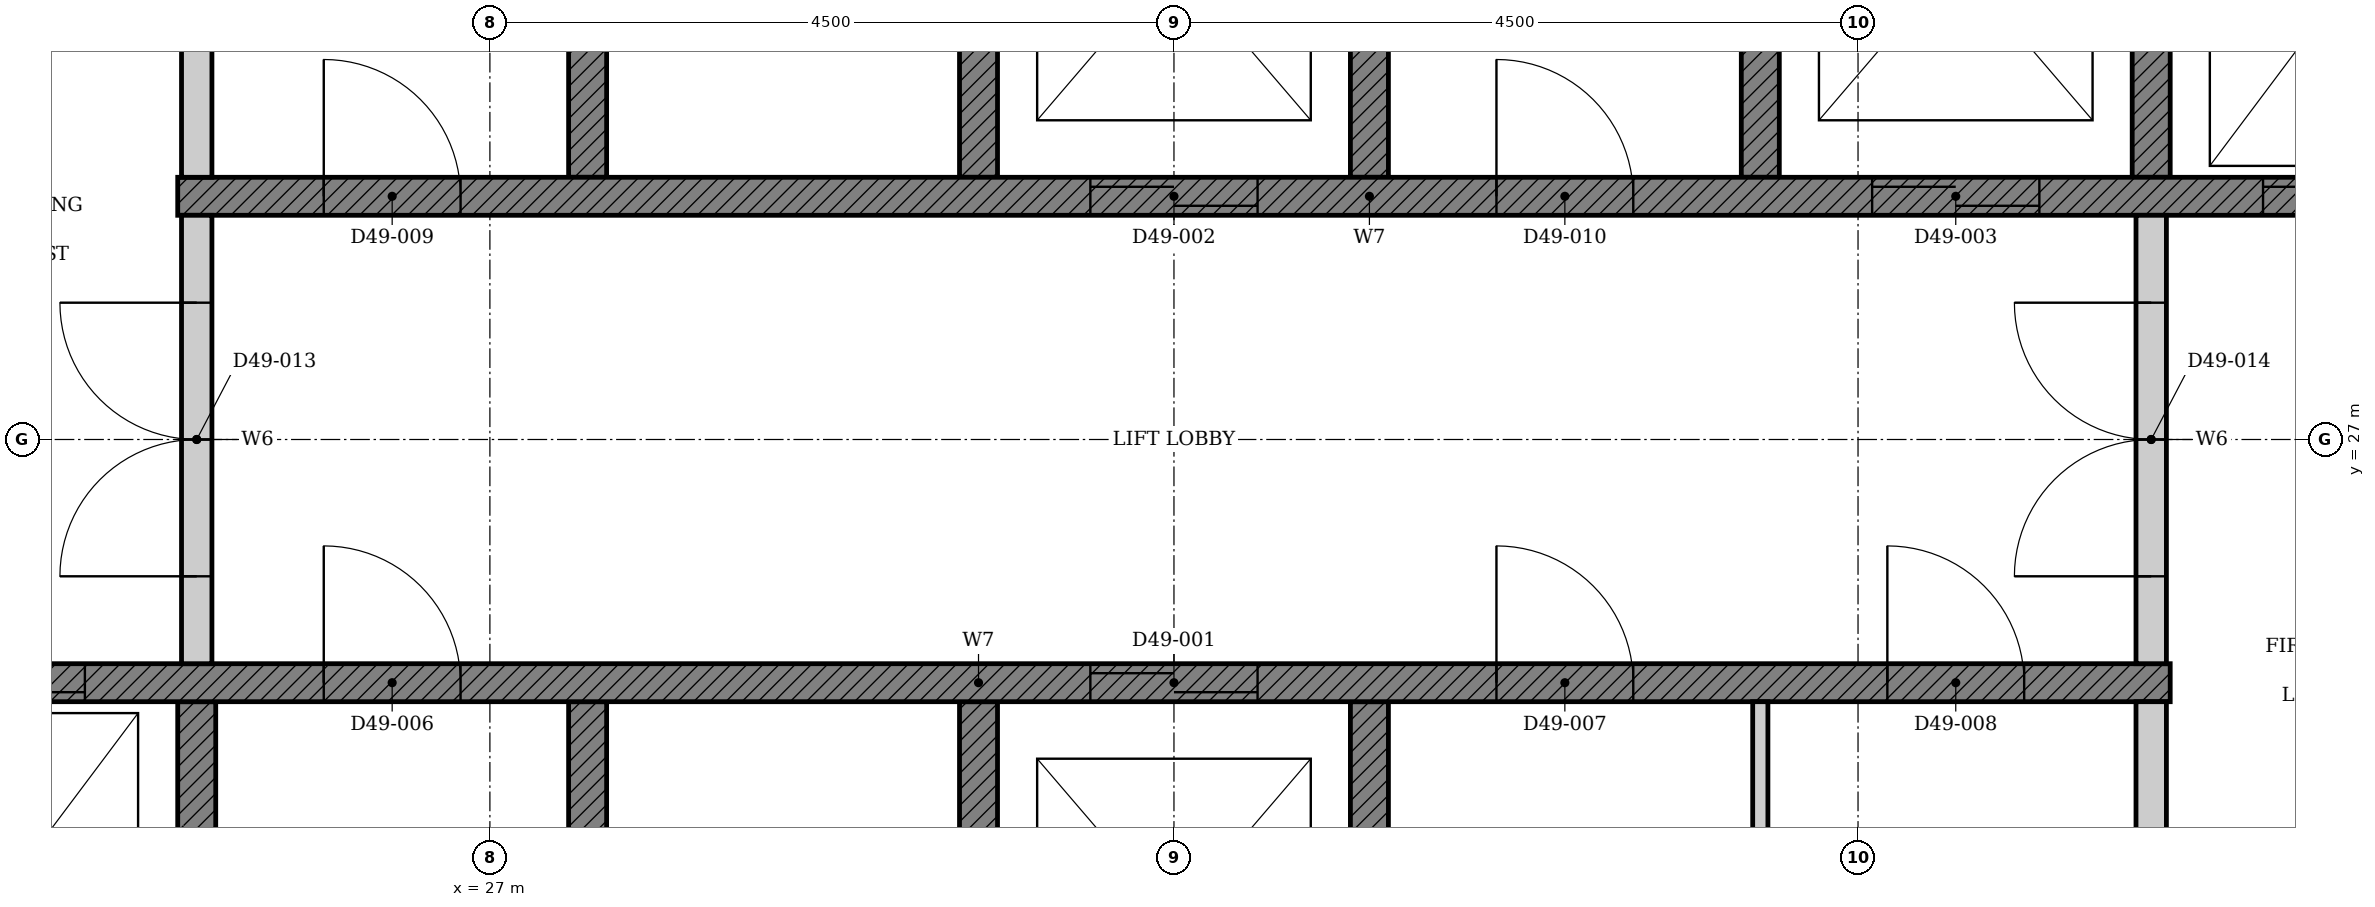
"""IFC4 building model, lengths in metres.
Left out: names, types, materials, properties, quantities, classifications, styles, units other than length and angle.
Written with IfcOpenShell. Run it as: python <this file> out.ifc"""

import sys

from ifc_helpers import new_model, si_unit, direction, frame, frame_2d, origin, place, context, subcontext, project, spatial, polyline, rectangle, outline, extrude, element, fill, save


model = new_model("IFC4")
c1 = context("Model", 3, precision=1e-05, world=origin(), true_north=direction((0.0, 1.0)))
c2 = subcontext(c1, "Body", "Model", "MODEL_VIEW")
j1 = project(units=[si_unit("LENGTHUNIT", "METRE"), si_unit("PLANEANGLEUNIT", "RADIAN")], contexts=[c1])
p1 = place(None, origin())
s1 = spatial("IfcSite", under=j1, at=p1, CompositionType="ELEMENT")
p2 = place(p1, origin())
s2 = spatial("IfcBuilding", under=s1, at=p2, CompositionType="ELEMENT")
p3 = place(p2, frame((0.0, 0.0, 196.1)))
s3 = spatial("IfcBuildingStorey", under=s2, at=p3, CompositionType="ELEMENT", Elevation=196.1)
p4 = place(p3, origin())
e1 = element("IfcWall", 1, at=p4, inside=s3, PredefinedType="SHEAR", context=c2, shape_type="SweptSolid", body=[
    extrude(outline(polyline([(22.375, 22.35), (25.197, 22.35), (25.197, 25.275), (24.947, 25.275), (24.947, 22.65), (22.625, 22.65), (22.625, 25.275), (22.375, 25.275), (22.375, 22.35)])), origin(), (0.0, 0.0, 1.0), 3.4),
])
p5 = place(p3, origin())
e2 = element("IfcWall", 2, at=p5, inside=s3, PredefinedType="SHEAR", context=c2, shape_type="SweptSolid", body=[
    extrude(outline(polyline([(27.518, 22.35), (32.911, 22.35), (32.911, 25.275), (32.661, 25.275), (32.661, 22.65), (30.339, 22.65), (30.339, 25.275), (30.089, 25.275), (30.089, 22.65), (27.768, 22.65), (27.768, 25.275), (27.518, 25.275), (27.518, 22.35)])), origin(), (0.0, 0.0, 1.0), 3.4),
])
p6 = place(p3, origin())
e3 = element("IfcWall", 3, at=p6, inside=s3, PredefinedType="SHEAR", context=c2, shape_type="SweptSolid", body=[
    extrude(outline(polyline([(27.518, 28.725), (27.768, 28.725), (27.768, 31.35), (30.089, 31.35), (30.089, 28.725), (30.339, 28.725), (30.339, 31.35), (32.661, 31.35), (32.661, 28.725), (32.911, 28.725), (32.911, 31.65), (27.518, 31.65), (27.518, 28.725)])), origin(), (0.0, 0.0, 1.0), 3.4),
])
p7 = place(p3, origin())
e4 = element("IfcWall", 4, at=p7, inside=s3, PredefinedType="SHEAR", context=c2, shape_type="SweptSolid", body=[
    extrude(outline(polyline([(35.232, 28.725), (35.482, 28.725), (35.482, 31.35), (37.803, 31.35), (37.803, 28.725), (38.053, 28.725), (38.053, 31.35), (40.375, 31.35), (40.375, 28.725), (40.625, 28.725), (40.625, 31.65), (35.232, 31.65), (35.232, 28.725)])), origin(), (0.0, 0.0, 1.0), 3.4),
])
p8 = place(p3, frame((22.375, 25.4, 0.0), z_axis=(0.0, 0.0, 1.0), x_axis=(1.0, 0.0, 0.0)))
e5 = element("IfcWall", 5, at=p8, inside=s3, PredefinedType="SHEAR", context=c2, shape_type="SweptSolid", body=[
    extrude(rectangle(XDim=15.678, YDim=0.25, at=frame_2d((7.839, 0.0))), origin(), (0.0, 0.0, 1.0), 3.4),
])
p9 = place(p8, frame((8.575, 0.0, 0.0)))
e6 = element("IfcOpeningElement", 6, at=p9, cuts=e5, PredefinedType="OPENING", context=c2, shape_type="SweptSolid", body=[
    extrude(rectangle(XDim=1.1, YDim=2.1, at=frame_2d((0.55, 1.05))), frame((0.0, 0.135, 0.0), z_axis=(0.0, -1.0, 0.0), x_axis=(1.0, 0.0, 0.0)), (0.0, 0.0, 1.0), 0.27),
])
p10 = place(p8, frame((0.861, 0.0, 0.0)))
e7 = element("IfcOpeningElement", 7, at=p10, cuts=e5, PredefinedType="OPENING", context=c2, shape_type="SweptSolid", body=[
    extrude(rectangle(XDim=1.1, YDim=2.1, at=frame_2d((0.55, 1.05))), frame((0.0, 0.135, 0.0), z_axis=(0.0, -1.0, 0.0), x_axis=(1.0, 0.0, 0.0)), (0.0, 0.0, 1.0), 0.27),
])
p11 = place(p8, frame((3.532, 0.0, 0.0)))
e8 = element("IfcOpeningElement", 8, at=p11, cuts=e5, PredefinedType="OPENING", context=c2, shape_type="SweptSolid", body=[
    extrude(rectangle(XDim=0.9, YDim=2.1, at=frame_2d((0.45, 1.05))), frame((0.0, 0.135, 0.0), z_axis=(0.0, -1.0, 0.0), x_axis=(1.0, 0.0, 0.0)), (0.0, 0.0, 1.0), 0.27),
])
p12 = place(p8, frame((11.246, 0.0, 0.0)))
e9 = element("IfcOpeningElement", 9, at=p12, cuts=e5, PredefinedType="OPENING", context=c2, shape_type="SweptSolid", body=[
    extrude(rectangle(XDim=0.9, YDim=2.1, at=frame_2d((0.45, 1.05))), frame((0.0, 0.135, 0.0), z_axis=(0.0, -1.0, 0.0), x_axis=(1.0, 0.0, 0.0)), (0.0, 0.0, 1.0), 0.27),
])
p13 = place(p8, frame((13.818, 0.0, 0.0)))
e10 = element("IfcOpeningElement", 10, at=p13, cuts=e5, PredefinedType="OPENING", context=c2, shape_type="SweptSolid", body=[
    extrude(rectangle(XDim=0.9, YDim=2.1, at=frame_2d((0.45, 1.05))), frame((0.0, 0.135, 0.0), z_axis=(0.0, -1.0, 0.0), x_axis=(1.0, 0.0, 0.0)), (0.0, 0.0, 1.0), 0.27),
])
p14 = place(p3, frame((24.947, 28.6, 0.0), z_axis=(0.0, 0.0, 1.0), x_axis=(1.0, 0.0, 0.0)))
e11 = element("IfcWall", 11, at=p14, inside=s3, PredefinedType="SHEAR", context=c2, shape_type="SweptSolid", body=[
    extrude(rectangle(XDim=15.678, YDim=0.25, at=frame_2d((7.839, 0.0))), origin(), (0.0, 0.0, 1.0), 3.4),
])
p15 = place(p14, frame((6.004, 0.0, 0.0)))
e12 = element("IfcOpeningElement", 12, at=p15, cuts=e11, PredefinedType="OPENING", context=c2, shape_type="SweptSolid", body=[
    extrude(rectangle(XDim=1.1, YDim=2.1, at=frame_2d((0.55, 1.05))), frame((0.0, 0.135, 0.0), z_axis=(0.0, -1.0, 0.0), x_axis=(1.0, 0.0, 0.0)), (0.0, 0.0, 1.0), 0.27),
])
p16 = place(p14, frame((11.146, 0.0, 0.0)))
e13 = element("IfcOpeningElement", 13, at=p16, cuts=e11, PredefinedType="OPENING", context=c2, shape_type="SweptSolid", body=[
    extrude(rectangle(XDim=1.1, YDim=2.1, at=frame_2d((0.55, 1.05))), frame((0.0, 0.135, 0.0), z_axis=(0.0, -1.0, 0.0), x_axis=(1.0, 0.0, 0.0)), (0.0, 0.0, 1.0), 0.27),
])
p17 = place(p14, frame((13.718, 0.0, 0.0)))
e14 = element("IfcOpeningElement", 14, at=p17, cuts=e11, PredefinedType="OPENING", context=c2, shape_type="SweptSolid", body=[
    extrude(rectangle(XDim=1.1, YDim=2.1, at=frame_2d((0.55, 1.05))), frame((0.0, 0.135, 0.0), z_axis=(0.0, -1.0, 0.0), x_axis=(1.0, 0.0, 0.0)), (0.0, 0.0, 1.0), 0.27),
])
p18 = place(p14, frame((0.961, 0.0, 0.0)))
e15 = element("IfcOpeningElement", 15, at=p18, cuts=e11, PredefinedType="OPENING", context=c2, shape_type="SweptSolid", body=[
    extrude(rectangle(XDim=0.9, YDim=2.1, at=frame_2d((0.45, 1.05))), frame((0.0, 0.135, 0.0), z_axis=(0.0, -1.0, 0.0), x_axis=(1.0, 0.0, 0.0)), (0.0, 0.0, 1.0), 0.27),
])
p19 = place(p14, frame((8.675, 0.0, 0.0)))
e16 = element("IfcOpeningElement", 16, at=p19, cuts=e11, PredefinedType="OPENING", context=c2, shape_type="SweptSolid", body=[
    extrude(rectangle(XDim=0.9, YDim=2.1, at=frame_2d((0.45, 1.05))), frame((0.0, 0.135, 0.0), z_axis=(0.0, -1.0, 0.0), x_axis=(1.0, 0.0, 0.0)), (0.0, 0.0, 1.0), 0.27),
])
p20 = place(p3, frame((37.928, 22.65, 0.0), z_axis=(0.0, 0.0, 1.0), x_axis=(0.0, 1.0, 0.0)))
e17 = element("IfcWall", 17, at=p20, inside=s3, PredefinedType="PARTITIONING", context=c2, shape_type="SweptSolid", body=[
    extrude(rectangle(XDim=2.625, YDim=0.2, at=frame_2d((1.312, 0.0))), origin(), (0.0, 0.0, 1.0), 3.4),
])
p21 = place(p3, frame((35.357, 22.65, 0.0), z_axis=(0.0, 0.0, 1.0), x_axis=(0.0, 1.0, 0.0)))
e18 = element("IfcWall", 18, at=p21, inside=s3, PredefinedType="PARTITIONING", context=c2, shape_type="SweptSolid", body=[
    extrude(rectangle(XDim=2.625, YDim=0.1, at=frame_2d((1.312, 0.0))), origin(), (0.0, 0.0, 1.0), 3.4),
])
p22 = place(p3, frame((25.072, 28.725, 0.0), z_axis=(0.0, 0.0, 1.0), x_axis=(0.0, 1.0, 0.0)))
e19 = element("IfcWall", 19, at=p22, inside=s3, PredefinedType="PARTITIONING", context=c2, shape_type="SweptSolid", body=[
    extrude(rectangle(XDim=2.625, YDim=0.2, at=frame_2d((1.312, 0.0))), origin(), (0.0, 0.0, 1.0), 3.4),
])
p23 = place(p3, frame((25.072, 25.525, 0.0), z_axis=(0.0, 0.0, 1.0), x_axis=(0.0, 1.0, 0.0)))
e20 = element("IfcWall", 20, at=p23, inside=s3, PredefinedType="PARTITIONING", context=c2, shape_type="SweptSolid", body=[
    extrude(rectangle(XDim=2.95, YDim=0.2, at=frame_2d((1.475, 0.0))), origin(), (0.0, 0.0, 1.0), 3.4),
])
p24 = place(p23, frame((0.575, 0.0, 0.0)))
e21 = element("IfcOpeningElement", 21, at=p24, cuts=e20, PredefinedType="OPENING", context=c2, shape_type="SweptSolid", body=[
    extrude(rectangle(XDim=1.8, YDim=2.1, at=frame_2d((0.9, 1.05))), frame((0.0, 0.11, 0.0), z_axis=(0.0, -1.0, 0.0), x_axis=(1.0, 0.0, 0.0)), (0.0, 0.0, 1.0), 0.22),
])
p25 = place(p3, frame((37.928, 25.525, 0.0), z_axis=(0.0, 0.0, 1.0), x_axis=(0.0, 1.0, 0.0)))
e22 = element("IfcWall", 22, at=p25, inside=s3, PredefinedType="PARTITIONING", context=c2, shape_type="SweptSolid", body=[
    extrude(rectangle(XDim=2.95, YDim=0.2, at=frame_2d((1.475, 0.0))), origin(), (0.0, 0.0, 1.0), 3.4),
])
p26 = place(p25, frame((0.575, 0.0, 0.0)))
e23 = element("IfcOpeningElement", 23, at=p26, cuts=e22, PredefinedType="OPENING", context=c2, shape_type="SweptSolid", body=[
    extrude(rectangle(XDim=1.8, YDim=2.1, at=frame_2d((0.9, 1.05))), frame((0.0, 0.11, 0.0), z_axis=(0.0, -1.0, 0.0), x_axis=(1.0, 0.0, 0.0)), (0.0, 0.0, 1.0), 0.22),
])
p27 = place(p9, origin())
e24 = element("IfcDoor", 24, at=p27, inside=s3, OperationType="DOUBLE_DOOR_SLIDING", PredefinedType="DOOR", context=c2, shape_type="SweptSolid", body=[
    extrude(rectangle(XDim=1.1, YDim=2.1, at=frame_2d((0.55, 1.05))), frame((0.0, 0.025, 0.0), z_axis=(0.0, -1.0, 0.0), x_axis=(1.0, 0.0, 0.0)), (0.0, 0.0, 1.0), 0.05),
])
fill(e6, e24)
p28 = place(p15, origin())
e25 = element("IfcDoor", 25, at=p28, inside=s3, OperationType="DOUBLE_DOOR_SLIDING", PredefinedType="DOOR", context=c2, shape_type="SweptSolid", body=[
    extrude(rectangle(XDim=1.1, YDim=2.1, at=frame_2d((0.55, 1.05))), frame((0.0, 0.025, 0.0), z_axis=(0.0, -1.0, 0.0), x_axis=(1.0, 0.0, 0.0)), (0.0, 0.0, 1.0), 0.05),
])
fill(e12, e25)
p29 = place(p16, origin())
e26 = element("IfcDoor", 26, at=p29, inside=s3, OperationType="DOUBLE_DOOR_SLIDING", PredefinedType="DOOR", context=c2, shape_type="SweptSolid", body=[
    extrude(rectangle(XDim=1.1, YDim=2.1, at=frame_2d((0.55, 1.05))), frame((0.0, 0.025, 0.0), z_axis=(0.0, -1.0, 0.0), x_axis=(1.0, 0.0, 0.0)), (0.0, 0.0, 1.0), 0.05),
])
fill(e13, e26)
p30 = place(p10, origin())
e27 = element("IfcDoor", 27, at=p30, inside=s3, OperationType="DOUBLE_DOOR_SLIDING", PredefinedType="DOOR", context=c2, shape_type="SweptSolid", body=[
    extrude(rectangle(XDim=1.1, YDim=2.1, at=frame_2d((0.55, 1.05))), frame((0.0, 0.025, 0.0), z_axis=(0.0, -1.0, 0.0), x_axis=(1.0, 0.0, 0.0)), (0.0, 0.0, 1.0), 0.05),
])
fill(e7, e27)
p31 = place(p17, origin())
e28 = element("IfcDoor", 28, at=p31, inside=s3, OperationType="DOUBLE_DOOR_SLIDING", PredefinedType="DOOR", context=c2, shape_type="SweptSolid", body=[
    extrude(rectangle(XDim=1.1, YDim=2.1, at=frame_2d((0.55, 1.05))), frame((0.0, 0.025, 0.0), z_axis=(0.0, -1.0, 0.0), x_axis=(1.0, 0.0, 0.0)), (0.0, 0.0, 1.0), 0.05),
])
fill(e14, e28)
p32 = place(p11, origin())
e29 = element("IfcDoor", 29, at=p32, inside=s3, OperationType="SINGLE_SWING_LEFT", PredefinedType="DOOR", context=c2, shape_type="SweptSolid", body=[
    extrude(rectangle(XDim=0.9, YDim=2.1, at=frame_2d((0.45, 1.05))), frame((0.0, 0.025, 0.0), z_axis=(0.0, -1.0, 0.0), x_axis=(1.0, 0.0, 0.0)), (0.0, 0.0, 1.0), 0.05),
])
fill(e8, e29)
p33 = place(p12, origin())
e30 = element("IfcDoor", 30, at=p33, inside=s3, OperationType="SINGLE_SWING_LEFT", PredefinedType="DOOR", context=c2, shape_type="SweptSolid", body=[
    extrude(rectangle(XDim=0.9, YDim=2.1, at=frame_2d((0.45, 1.05))), frame((0.0, 0.025, 0.0), z_axis=(0.0, -1.0, 0.0), x_axis=(1.0, 0.0, 0.0)), (0.0, 0.0, 1.0), 0.05),
])
fill(e9, e30)
p34 = place(p13, origin())
e31 = element("IfcDoor", 31, at=p34, inside=s3, OperationType="SINGLE_SWING_LEFT", PredefinedType="DOOR", context=c2, shape_type="SweptSolid", body=[
    extrude(rectangle(XDim=0.9, YDim=2.1, at=frame_2d((0.45, 1.05))), frame((0.0, 0.025, 0.0), z_axis=(0.0, -1.0, 0.0), x_axis=(1.0, 0.0, 0.0)), (0.0, 0.0, 1.0), 0.05),
])
fill(e10, e31)
p35 = place(p18, origin())
e32 = element("IfcDoor", 32, at=p35, inside=s3, OperationType="SINGLE_SWING_LEFT", PredefinedType="DOOR", context=c2, shape_type="SweptSolid", body=[
    extrude(rectangle(XDim=0.9, YDim=2.1, at=frame_2d((0.45, 1.05))), frame((0.0, 0.025, 0.0), z_axis=(0.0, -1.0, 0.0), x_axis=(1.0, 0.0, 0.0)), (0.0, 0.0, 1.0), 0.05),
])
fill(e15, e32)
p36 = place(p19, origin())
e33 = element("IfcDoor", 33, at=p36, inside=s3, OperationType="SINGLE_SWING_LEFT", PredefinedType="DOOR", context=c2, shape_type="SweptSolid", body=[
    extrude(rectangle(XDim=0.9, YDim=2.1, at=frame_2d((0.45, 1.05))), frame((0.0, 0.025, 0.0), z_axis=(0.0, -1.0, 0.0), x_axis=(1.0, 0.0, 0.0)), (0.0, 0.0, 1.0), 0.05),
])
fill(e16, e33)
p37 = place(p24, origin())
e34 = element("IfcDoor", 34, at=p37, inside=s3, OperationType="DOUBLE_DOOR_SINGLE_SWING", PredefinedType="DOOR", context=c2, shape_type="SweptSolid", body=[
    extrude(rectangle(XDim=1.8, YDim=2.1, at=frame_2d((0.9, 1.05))), frame((0.0, 0.025, 0.0), z_axis=(0.0, -1.0, 0.0), x_axis=(1.0, 0.0, 0.0)), (0.0, 0.0, 1.0), 0.05),
])
fill(e21, e34)
p38 = place(p26, origin())
e35 = element("IfcDoor", 35, at=p38, inside=s3, OperationType="DOUBLE_DOOR_SINGLE_SWING", PredefinedType="DOOR", context=c2, shape_type="SweptSolid", body=[
    extrude(rectangle(XDim=1.8, YDim=2.1, at=frame_2d((0.9, 1.05))), frame((0.0, 0.025, 0.0), z_axis=(0.0, -1.0, 0.0), x_axis=(1.0, 0.0, 0.0)), (0.0, 0.0, 1.0), 0.05),
])
fill(e23, e35)
save(model, sys.argv[1])
